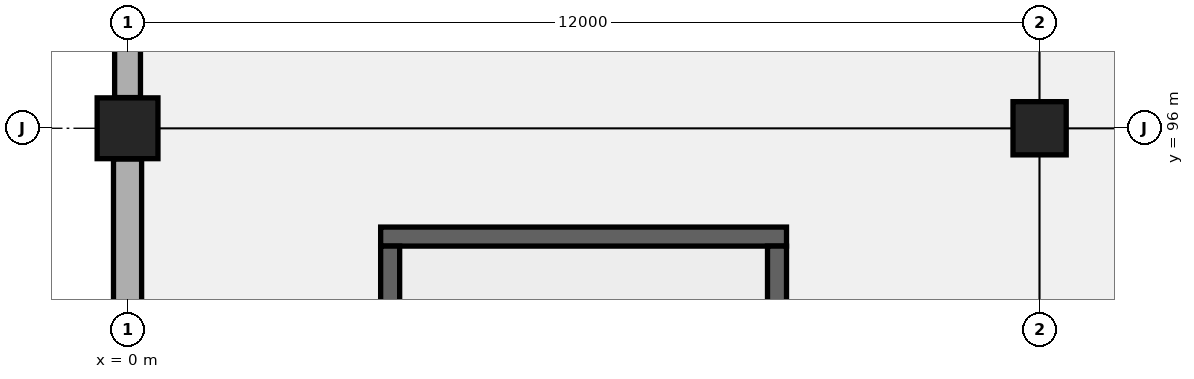
"""IFC4 building model, lengths in metres.
Left out: names, types, materials, properties, quantities, classifications, styles, units other than length and angle.
Written with IfcOpenShell. Run it as: python <this file> out.ifc"""

import sys

from ifc_helpers import new_model, si_unit, direction, frame, frame_2d, origin, origin_2d, place, context, subcontext, project, spatial, rectangle, extrude, element, save


model = new_model("IFC4")
c1 = context("Model", 3, precision=1e-05, world=origin(), true_north=direction((0.0, 1.0)))
c2 = subcontext(c1, "Body", "Model", "MODEL_VIEW")
j1 = project(units=[si_unit("LENGTHUNIT", "METRE"), si_unit("PLANEANGLEUNIT", "RADIAN")], contexts=[c1])
p1 = place(None, origin())
s1 = spatial("IfcSite", under=j1, at=p1, CompositionType="ELEMENT")
p2 = place(p1, origin())
s2 = spatial("IfcBuilding", under=s1, at=p2, CompositionType="ELEMENT")
p3 = place(p2, frame((0.0, 0.0, 15.3)))
s3 = spatial("IfcBuildingStorey", under=s2, at=p3, CompositionType="ELEMENT", Elevation=15.3)
p4 = place(p3, frame((0.0, 96.0, 0.0), z_axis=(0.0, 0.0, 1.0), x_axis=(1.0, 0.0, 0.0)))
e1 = element("IfcColumn", 1, at=p4, inside=s3, PredefinedType="COLUMN", context=c2, shape_type="SweptSolid", body=[
    extrude(rectangle(XDim=0.8, YDim=0.8, at=origin_2d()), origin(), (0.0, 0.0, 1.0), 5.1),
])
p5 = place(p3, frame((12.0, 96.0, 0.0), z_axis=(0.0, 0.0, 1.0), x_axis=(1.0, 0.0, 0.0)))
e2 = element("IfcColumn", 2, at=p5, inside=s3, PredefinedType="COLUMN", context=c2, shape_type="SweptSolid", body=[
    extrude(rectangle(XDim=0.7, YDim=0.7, at=origin_2d()), origin(), (0.0, 0.0, 1.0), 5.1),
])
p6 = place(p3, frame((0.0, 84.179, 0.0), z_axis=(0.0, 0.0, 1.0), x_axis=(0.0, 1.0, 0.0)))
e3 = element("IfcWall", 3, at=p6, inside=s3, PredefinedType="SOLIDWALL", context=c2, shape_type="SweptSolid", body=[
    extrude(rectangle(XDim=11.417, YDim=0.37, at=frame_2d((5.708, 0.0))), origin(), (0.0, 0.0, 1.0), 4.16),
])
p7 = place(p6, frame((2.75, 0.0, 0.95)))
e4 = element("IfcOpeningElement", 4, at=p7, cuts=e3, PredefinedType="OPENING", context=c2, shape_type="SweptSolid", body=[
    extrude(rectangle(XDim=1.95, YDim=1.9, at=frame_2d((0.975, 0.95))), frame((0.0, 0.195, 0.0), z_axis=(0.0, -1.0, 0.0), x_axis=(1.0, 0.0, 0.0)), (0.0, 0.0, 1.0), 0.39),
])
p8 = place(p3, frame((0.0, 96.404, 0.0), z_axis=(0.0, 0.0, 1.0), x_axis=(0.0, 1.0, 0.0)))
e5 = element("IfcWall", 5, at=p8, inside=s3, PredefinedType="SOLIDWALL", context=c2, shape_type="SweptSolid", body=[
    extrude(rectangle(XDim=11.242, YDim=0.34, at=frame_2d((5.621, 0.0))), origin(), (0.0, 0.0, 1.0), 4.172),
])
p9 = place(p8, frame((1.5, 0.0, 0.95)))
e6 = element("IfcOpeningElement", 6, at=p9, cuts=e5, PredefinedType="OPENING", context=c2, shape_type="SweptSolid", body=[
    extrude(rectangle(XDim=1.95, YDim=2.35, at=frame_2d((0.975, 1.175))), frame((0.0, 0.18, 0.0), z_axis=(0.0, -1.0, 0.0), x_axis=(1.0, 0.0, 0.0)), (0.0, 0.0, 1.0), 0.36),
])
p10 = place(p3, frame((3.33, 94.575, 0.0), z_axis=(0.0, 0.0, 1.0), x_axis=(1.0, 0.0, 0.0)))
e7 = element("IfcWall", 7, at=p10, inside=s3, PredefinedType="SHEAR", context=c2, shape_type="SweptSolid", body=[
    extrude(rectangle(XDim=5.34, YDim=0.25, at=frame_2d((2.67, 0.0))), origin(), (0.0, 0.0, 1.0), 4.86),
])
for number, where, z_axis, x_axis in (
    (8, (3.455, 85.55, 0.0), (0.0, 0.0, 1.0), (0.0, 1.0, 0.0)),
    (9, (8.545, 85.55, 0.0), (0.0, 0.0, 1.0), (0.0, 1.0, 0.0)),
):
    element("IfcWall", number, at=place(p3, frame(where, z_axis=z_axis, x_axis=x_axis)), inside=s3, PredefinedType="SHEAR", context=c2, shape_type="SweptSolid", body=[
        extrude(rectangle(XDim=8.9, YDim=0.25, at=frame_2d((4.45, 0.0))), origin(), (0.0, 0.0, 1.0), 4.86),
    ])
save(model, sys.argv[1])
